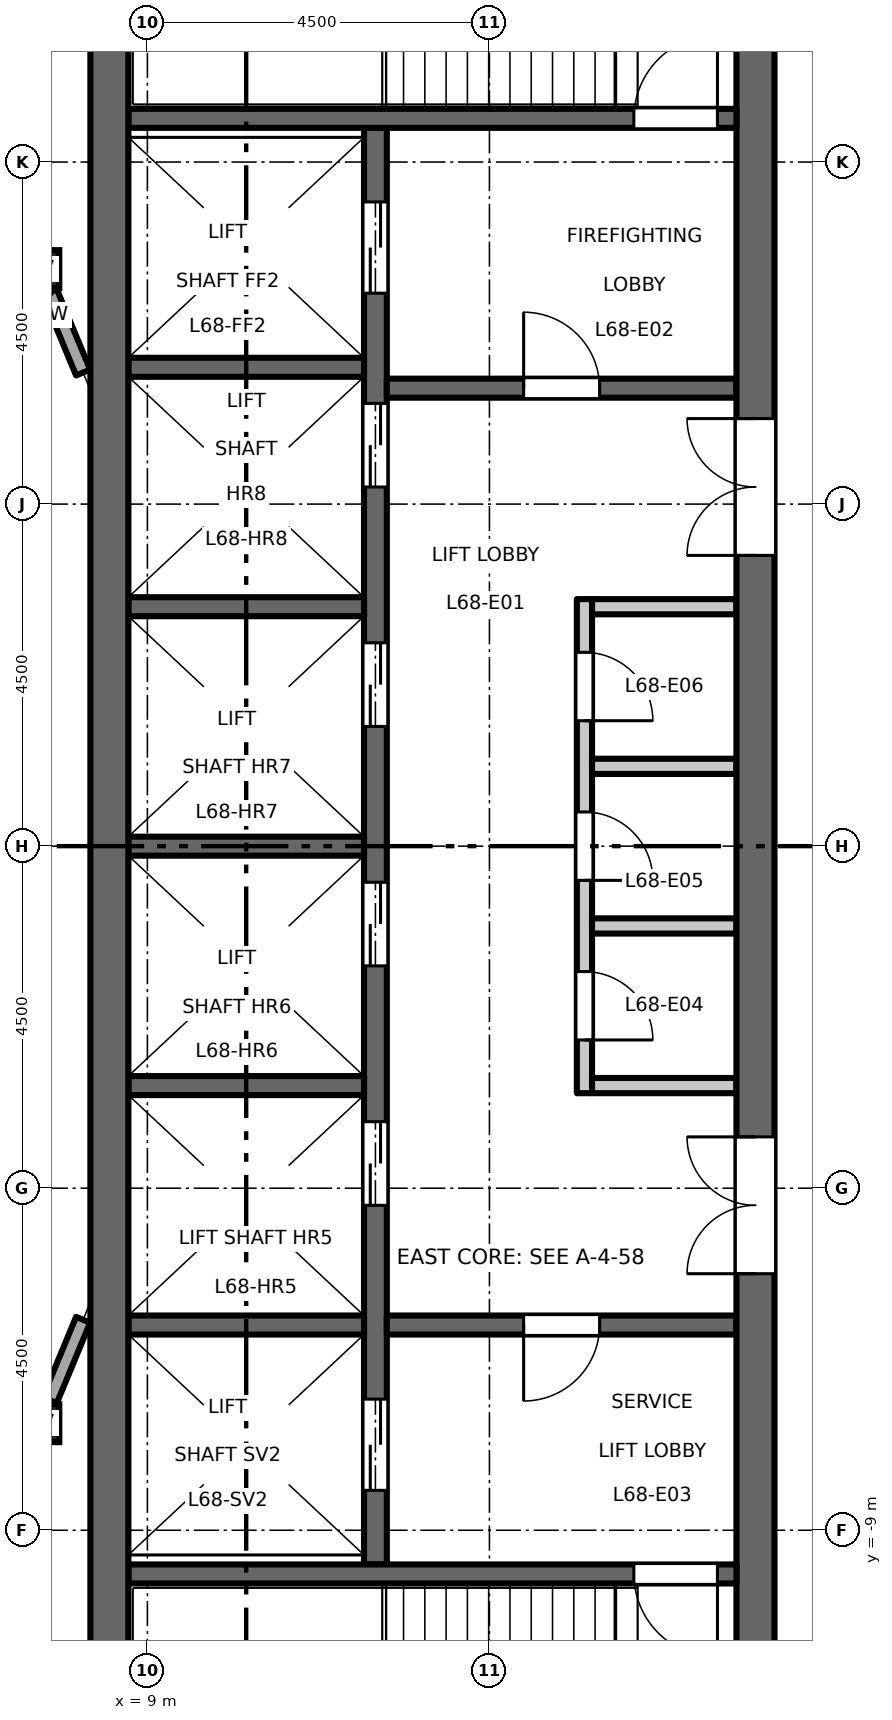
"""IFC4 building model, lengths in metres.
Left out: names, types, materials, properties, quantities, classifications, styles, units other than length and angle.
Written with IfcOpenShell. Run it as: python <this file> out.ifc"""

import sys

from ifc_helpers import new_model, si_unit, direction, frame, frame_2d, origin, origin_2d, place, context, subcontext, project, spatial, rectangle, hollow_rectangle, extrude, element, fill, save


model = new_model("IFC4")
c1 = context("Model", 3, precision=1e-05, world=origin(), true_north=direction((0.0, 1.0)))
c2 = subcontext(c1, "Body", "Model", "MODEL_VIEW")
j1 = project(units=[si_unit("LENGTHUNIT", "METRE"), si_unit("PLANEANGLEUNIT", "RADIAN")], contexts=[c1])
p1 = place(None, origin())
s1 = spatial("IfcSite", under=j1, at=p1, CompositionType="ELEMENT")
p2 = place(p1, origin())
s2 = spatial("IfcBuilding", under=s1, at=p2, CompositionType="ELEMENT")
p3 = place(p2, frame((0.0, 0.0, 316.7)))
s3 = spatial("IfcBuildingStorey", under=s2, at=p3, CompositionType="ELEMENT", Elevation=316.7)
for number, where, z_axis, x_axis in (
    (1, (7.591, -7.591, 0.0), (0.0, 0.0, 1.0), (1.0, 0.0, 0.0)),
    (2, (7.591, 7.591, 0.0), (0.0, 0.0, 1.0), (1.0, 0.0, 0.0)),
):
    element("IfcColumn", number, at=place(p3, frame(where, z_axis=z_axis, x_axis=x_axis)), inside=s3, PredefinedType="COLUMN", context=c2, shape_type="SweptSolid", body=[
        extrude(hollow_rectangle(XDim=0.5, YDim=0.5, WallThickness=0.025, at=origin_2d()), origin(), (0.0, 0.0, 1.0), 4.5),
    ])
p4 = place(p3, frame((14.75, -3.25, 0.0), z_axis=(0.0, 0.0, 1.0), x_axis=(0.0, 1.0, 0.0)))
e3 = element("IfcWall", 3, at=p4, inside=s3, PredefinedType="PARTITIONING", context=c2, shape_type="SweptSolid", body=[
    extrude(rectangle(XDim=6.5, YDim=0.2, at=frame_2d((3.25, 0.0))), origin(), (0.0, 0.0, 1.0), 4.35),
])
p5 = place(p4, frame((0.7, 0.0, 0.0)))
e4 = element("IfcOpeningElement", 4, at=p5, cuts=e3, PredefinedType="OPENING", context=c2, shape_type="SweptSolid", body=[
    extrude(rectangle(XDim=0.9, YDim=2.1, at=frame_2d((0.45, 1.05))), frame((0.0, 0.11, 0.0), z_axis=(0.0, -1.0, 0.0), x_axis=(1.0, 0.0, 0.0)), (0.0, 0.0, 1.0), 0.22),
])
p6 = place(p4, frame((2.8, 0.0, 0.0)))
e5 = element("IfcOpeningElement", 5, at=p6, cuts=e3, PredefinedType="OPENING", context=c2, shape_type="SweptSolid", body=[
    extrude(rectangle(XDim=0.9, YDim=2.1, at=frame_2d((0.45, 1.05))), frame((0.0, 0.11, 0.0), z_axis=(0.0, -1.0, 0.0), x_axis=(1.0, 0.0, 0.0)), (0.0, 0.0, 1.0), 0.22),
])
p7 = place(p4, frame((4.9, 0.0, 0.0)))
e6 = element("IfcOpeningElement", 6, at=p7, cuts=e3, PredefinedType="OPENING", context=c2, shape_type="SweptSolid", body=[
    extrude(rectangle(XDim=0.9, YDim=2.1, at=frame_2d((0.45, 1.05))), frame((0.0, 0.11, 0.0), z_axis=(0.0, -1.0, 0.0), x_axis=(1.0, 0.0, 0.0)), (0.0, 0.0, 1.0), 0.22),
])
for number, where, z_axis, x_axis in (
    (7, (14.85, 3.15, 0.0), (0.0, 0.0, 1.0), (1.0, 0.0, 0.0)),
    (8, (14.85, -3.15, 0.0), (0.0, 0.0, 1.0), (1.0, 0.0, 0.0)),
    (9, (14.85, -1.05, 0.0), (0.0, 0.0, 1.0), (1.0, 0.0, 0.0)),
    (10, (14.85, 1.05, 0.0), (0.0, 0.0, 1.0), (1.0, 0.0, 0.0)),
):
    element("IfcWall", number, at=place(p3, frame(where, z_axis=z_axis, x_axis=x_axis)), inside=s3, PredefinedType="PARTITIONING", context=c2, shape_type="SweptSolid", body=[
        extrude(rectangle(XDim=1.9, YDim=0.2, at=frame_2d((0.95, 0.0))), origin(), (0.0, 0.0, 1.0), 4.35),
    ])
p8 = place(p3, frame((12.0, -9.45, 0.0), z_axis=(0.0, 0.0, 1.0), x_axis=(0.0, 1.0, 0.0)))
e11 = element("IfcWall", 11, at=p8, inside=s3, PredefinedType="SHEAR", context=c2, shape_type="SweptSolid", body=[
    extrude(rectangle(XDim=18.9, YDim=0.3, at=frame_2d((9.45, 0.0))), origin(), (0.0, 0.0, 1.0), 4.35),
])
p9 = place(p8, frame((4.725, 0.0, 0.0)))
e12 = element("IfcOpeningElement", 12, at=p9, cuts=e11, PredefinedType="OPENING", context=c2, shape_type="SweptSolid", body=[
    extrude(rectangle(XDim=1.1, YDim=2.1, at=frame_2d((0.55, 1.05))), frame((0.0, 0.16, 0.0), z_axis=(0.0, -1.0, 0.0), x_axis=(1.0, 0.0, 0.0)), (0.0, 0.0, 1.0), 0.32),
])
p10 = place(p8, frame((7.875, 0.0, 0.0)))
e13 = element("IfcOpeningElement", 13, at=p10, cuts=e11, PredefinedType="OPENING", context=c2, shape_type="SweptSolid", body=[
    extrude(rectangle(XDim=1.1, YDim=2.1, at=frame_2d((0.55, 1.05))), frame((0.0, 0.16, 0.0), z_axis=(0.0, -1.0, 0.0), x_axis=(1.0, 0.0, 0.0)), (0.0, 0.0, 1.0), 0.32),
])
p11 = place(p8, frame((11.025, 0.0, 0.0)))
e14 = element("IfcOpeningElement", 14, at=p11, cuts=e11, PredefinedType="OPENING", context=c2, shape_type="SweptSolid", body=[
    extrude(rectangle(XDim=1.1, YDim=2.1, at=frame_2d((0.55, 1.05))), frame((0.0, 0.16, 0.0), z_axis=(0.0, -1.0, 0.0), x_axis=(1.0, 0.0, 0.0)), (0.0, 0.0, 1.0), 0.32),
])
p12 = place(p8, frame((14.175, 0.0, 0.0)))
e15 = element("IfcOpeningElement", 15, at=p12, cuts=e11, PredefinedType="OPENING", context=c2, shape_type="SweptSolid", body=[
    extrude(rectangle(XDim=1.1, YDim=2.1, at=frame_2d((0.55, 1.05))), frame((0.0, 0.16, 0.0), z_axis=(0.0, -1.0, 0.0), x_axis=(1.0, 0.0, 0.0)), (0.0, 0.0, 1.0), 0.32),
])
p13 = place(p8, frame((16.725, 0.0, 0.0)))
e16 = element("IfcOpeningElement", 16, at=p13, cuts=e11, PredefinedType="OPENING", context=c2, shape_type="SweptSolid", body=[
    extrude(rectangle(XDim=1.2, YDim=2.1, at=frame_2d((0.6, 1.05))), frame((0.0, 0.16, 0.0), z_axis=(0.0, -1.0, 0.0), x_axis=(1.0, 0.0, 0.0)), (0.0, 0.0, 1.0), 0.32),
])
p14 = place(p8, frame((0.975, 0.0, 0.0)))
e17 = element("IfcOpeningElement", 17, at=p14, cuts=e11, PredefinedType="OPENING", context=c2, shape_type="SweptSolid", body=[
    extrude(rectangle(XDim=1.2, YDim=2.1, at=frame_2d((0.6, 1.05))), frame((0.0, 0.16, 0.0), z_axis=(0.0, -1.0, 0.0), x_axis=(1.0, 0.0, 0.0)), (0.0, 0.0, 1.0), 0.32),
])
p15 = place(p3, frame((12.15, 6.025, 0.0), z_axis=(0.0, 0.0, 1.0), x_axis=(1.0, 0.0, 0.0)))
e18 = element("IfcWall", 18, at=p15, inside=s3, PredefinedType="SHEAR", context=c2, shape_type="SweptSolid", body=[
    extrude(rectangle(XDim=4.6, YDim=0.25, at=frame_2d((2.3, 0.0))), origin(), (0.0, 0.0, 1.0), 4.35),
])
p16 = place(p15, frame((1.8, 0.0, 0.0)))
e19 = element("IfcOpeningElement", 19, at=p16, cuts=e18, PredefinedType="OPENING", context=c2, shape_type="SweptSolid", body=[
    extrude(rectangle(XDim=1.0, YDim=2.1, at=frame_2d((0.5, 1.05))), frame((0.0, 0.135, 0.0), z_axis=(0.0, -1.0, 0.0), x_axis=(1.0, 0.0, 0.0)), (0.0, 0.0, 1.0), 0.27),
])
p17 = place(p3, frame((12.15, -6.3, 0.0), z_axis=(0.0, 0.0, 1.0), x_axis=(1.0, 0.0, 0.0)))
e20 = element("IfcWall", 20, at=p17, inside=s3, PredefinedType="SHEAR", context=c2, shape_type="SweptSolid", body=[
    extrude(rectangle(XDim=4.6, YDim=0.25, at=frame_2d((2.3, 0.0))), origin(), (0.0, 0.0, 1.0), 4.35),
])
p18 = place(p17, frame((1.8, 0.0, 0.0)))
e21 = element("IfcOpeningElement", 21, at=p18, cuts=e20, PredefinedType="OPENING", context=c2, shape_type="SweptSolid", body=[
    extrude(rectangle(XDim=1.0, YDim=2.1, at=frame_2d((0.5, 1.05))), frame((0.0, 0.135, 0.0), z_axis=(0.0, -1.0, 0.0), x_axis=(1.0, 0.0, 0.0)), (0.0, 0.0, 1.0), 0.27),
])
p19 = place(p3, frame((17.0, -13.0, 0.0), z_axis=(0.0, 0.0, 1.0), x_axis=(0.0, 1.0, 0.0)))
e22 = element("IfcWall", 22, at=p19, inside=s3, PredefinedType="SHEAR", context=c2, shape_type="SweptSolid", body=[
    extrude(rectangle(XDim=26.0, YDim=0.5, at=frame_2d((13.0, 0.0))), origin(), (0.0, 0.0, 1.0), 4.35),
])
p20 = place(p19, frame((16.825, 0.0, 0.0)))
e23 = element("IfcOpeningElement", 23, at=p20, cuts=e22, PredefinedType="OPENING", context=c2, shape_type="SweptSolid", body=[
    extrude(rectangle(XDim=1.8, YDim=2.1, at=frame_2d((0.9, 1.05))), frame((0.0, 0.26, 0.0), z_axis=(0.0, -1.0, 0.0), x_axis=(1.0, 0.0, 0.0)), (0.0, 0.0, 1.0), 0.52),
])
p21 = place(p19, frame((7.375, 0.0, 0.0)))
e24 = element("IfcOpeningElement", 24, at=p21, cuts=e22, PredefinedType="OPENING", context=c2, shape_type="SweptSolid", body=[
    extrude(rectangle(XDim=1.8, YDim=2.1, at=frame_2d((0.9, 1.05))), frame((0.0, 0.26, 0.0), z_axis=(0.0, -1.0, 0.0), x_axis=(1.0, 0.0, 0.0)), (0.0, 0.0, 1.0), 0.52),
])
for number, where, z_axis, x_axis in (
    (25, (8.75, 0.0, 0.0), (0.0, 0.0, 1.0), (1.0, 0.0, 0.0)),
    (26, (8.75, 3.15, 0.0), (0.0, 0.0, 1.0), (1.0, 0.0, 0.0)),
    (27, (8.75, 6.3, 0.0), (0.0, 0.0, 1.0), (1.0, 0.0, 0.0)),
    (28, (8.75, -3.15, 0.0), (0.0, 0.0, 1.0), (1.0, 0.0, 0.0)),
    (29, (8.75, -6.3, 0.0), (0.0, 0.0, 1.0), (1.0, 0.0, 0.0)),
):
    element("IfcWall", number, at=place(p3, frame(where, z_axis=z_axis, x_axis=x_axis)), inside=s3, PredefinedType="SHEAR", context=c2, shape_type="SweptSolid", body=[
        extrude(rectangle(XDim=3.1, YDim=0.25, at=frame_2d((1.55, 0.0))), origin(), (0.0, 0.0, 1.0), 4.35),
    ])
p22 = place(p3, frame((8.75, 9.575, 0.0), z_axis=(0.0, 0.0, 1.0), x_axis=(1.0, 0.0, 0.0)))
e30 = element("IfcWall", 30, at=p22, inside=s3, PredefinedType="SHEAR", context=c2, shape_type="SweptSolid", body=[
    extrude(rectangle(XDim=8.0, YDim=0.25, at=frame_2d((4.0, 0.0))), origin(), (0.0, 0.0, 1.0), 4.35),
])
p23 = place(p22, frame((6.65, 0.0, 0.0)))
e31 = element("IfcOpeningElement", 31, at=p23, cuts=e30, PredefinedType="OPENING", context=c2, shape_type="SweptSolid", body=[
    extrude(rectangle(XDim=1.1, YDim=2.1, at=frame_2d((0.55, 1.05))), frame((0.0, 0.135, 0.0), z_axis=(0.0, -1.0, 0.0), x_axis=(1.0, 0.0, 0.0)), (0.0, 0.0, 1.0), 0.27),
])
p24 = place(p3, frame((8.75, -9.575, 0.0), z_axis=(0.0, 0.0, 1.0), x_axis=(1.0, 0.0, 0.0)))
e32 = element("IfcWall", 32, at=p24, inside=s3, PredefinedType="SHEAR", context=c2, shape_type="SweptSolid", body=[
    extrude(rectangle(XDim=8.0, YDim=0.25, at=frame_2d((4.0, 0.0))), origin(), (0.0, 0.0, 1.0), 4.35),
])
p25 = place(p24, frame((6.65, 0.0, 0.0)))
e33 = element("IfcOpeningElement", 33, at=p25, cuts=e32, PredefinedType="OPENING", context=c2, shape_type="SweptSolid", body=[
    extrude(rectangle(XDim=1.1, YDim=2.1, at=frame_2d((0.55, 1.05))), frame((0.0, 0.135, 0.0), z_axis=(0.0, -1.0, 0.0), x_axis=(1.0, 0.0, 0.0)), (0.0, 0.0, 1.0), 0.27),
])
p26 = place(p3, frame((8.5, -13.0, 0.0), z_axis=(0.0, 0.0, 1.0), x_axis=(0.0, 1.0, 0.0)))
e34 = element("IfcWall", 34, at=p26, inside=s3, PredefinedType="SHEAR", context=c2, shape_type="SweptSolid", body=[
    extrude(rectangle(XDim=26.0, YDim=0.5, at=frame_2d((13.0, 0.0))), origin(), (0.0, 0.0, 1.0), 4.35),
])
for number, where, z_axis, x_axis in (
    (35, (7.716, -7.289, 0.0), (0.0, 0.0, 1.0), (0.383, 0.924, 0.0)),
    (36, (8.154, 6.231, 0.0), (0.0, 0.0, 1.0), (-0.383, 0.924, 0.0)),
):
    element("IfcWall", number, at=place(p3, frame(where, z_axis=z_axis, x_axis=x_axis)), inside=s3, PredefinedType="STANDARD", context=c2, shape_type="SweptSolid", body=[
        extrude(rectangle(XDim=1.146, YDim=0.2, at=frame_2d((0.573, 0.0))), origin(), (0.0, 0.0, 1.0), 4.01),
    ])
p27 = place(p16, origin())
e37 = element("IfcDoor", 37, at=p27, inside=s3, OperationType="SINGLE_SWING_RIGHT", PredefinedType="DOOR", context=c2, shape_type="SweptSolid", body=[
    extrude(rectangle(XDim=1.0, YDim=2.1, at=frame_2d((0.5, 1.05))), frame((0.0, 0.025, 0.0), z_axis=(0.0, -1.0, 0.0), x_axis=(1.0, 0.0, 0.0)), (0.0, 0.0, 1.0), 0.05),
])
fill(e19, e37)
p28 = place(p18, origin())
e38 = element("IfcDoor", 38, at=p28, inside=s3, OperationType="SINGLE_SWING_LEFT", PredefinedType="DOOR", context=c2, shape_type="SweptSolid", body=[
    extrude(rectangle(XDim=1.0, YDim=2.1, at=frame_2d((0.5, 1.05))), frame((0.0, 0.025, 0.0), z_axis=(0.0, -1.0, 0.0), x_axis=(1.0, 0.0, 0.0)), (0.0, 0.0, 1.0), 0.05),
])
fill(e21, e38)
p29 = place(p23, origin())
e39 = element("IfcDoor", 39, at=p29, inside=s3, OperationType="SINGLE_SWING_LEFT", PredefinedType="DOOR", context=c2, shape_type="SweptSolid", body=[
    extrude(rectangle(XDim=1.1, YDim=2.1, at=frame_2d((0.55, 1.05))), frame((0.0, 0.025, 0.0), z_axis=(0.0, -1.0, 0.0), x_axis=(1.0, 0.0, 0.0)), (0.0, 0.0, 1.0), 0.05),
])
fill(e31, e39)
p30 = place(p25, origin())
e40 = element("IfcDoor", 40, at=p30, inside=s3, OperationType="SINGLE_SWING_RIGHT", PredefinedType="DOOR", context=c2, shape_type="SweptSolid", body=[
    extrude(rectangle(XDim=1.1, YDim=2.1, at=frame_2d((0.55, 1.05))), frame((0.0, 0.025, 0.0), z_axis=(0.0, -1.0, 0.0), x_axis=(1.0, 0.0, 0.0)), (0.0, 0.0, 1.0), 0.05),
])
fill(e33, e40)
p31 = place(p20, origin())
e41 = element("IfcDoor", 41, at=p31, inside=s3, OperationType="DOUBLE_DOOR_DOUBLE_SWING", PredefinedType="DOOR", context=c2, shape_type="SweptSolid", body=[
    extrude(rectangle(XDim=1.8, YDim=2.1, at=frame_2d((0.9, 1.05))), frame((0.0, 0.025, 0.0), z_axis=(0.0, -1.0, 0.0), x_axis=(1.0, 0.0, 0.0)), (0.0, 0.0, 1.0), 0.05),
])
fill(e23, e41)
p32 = place(p21, origin())
e42 = element("IfcDoor", 42, at=p32, inside=s3, OperationType="DOUBLE_DOOR_DOUBLE_SWING", PredefinedType="DOOR", context=c2, shape_type="SweptSolid", body=[
    extrude(rectangle(XDim=1.8, YDim=2.1, at=frame_2d((0.9, 1.05))), frame((0.0, 0.025, 0.0), z_axis=(0.0, -1.0, 0.0), x_axis=(1.0, 0.0, 0.0)), (0.0, 0.0, 1.0), 0.05),
])
fill(e24, e42)
p33 = place(p9, origin())
e43 = element("IfcDoor", 43, at=p33, inside=s3, OperationType="DOUBLE_DOOR_SLIDING", PredefinedType="DOOR", context=c2, shape_type="SweptSolid", body=[
    extrude(rectangle(XDim=1.1, YDim=2.1, at=frame_2d((0.55, 1.05))), frame((0.0, 0.025, 0.0), z_axis=(0.0, -1.0, 0.0), x_axis=(1.0, 0.0, 0.0)), (0.0, 0.0, 1.0), 0.05),
])
fill(e12, e43)
p34 = place(p10, origin())
e44 = element("IfcDoor", 44, at=p34, inside=s3, OperationType="DOUBLE_DOOR_SLIDING", PredefinedType="DOOR", context=c2, shape_type="SweptSolid", body=[
    extrude(rectangle(XDim=1.1, YDim=2.1, at=frame_2d((0.55, 1.05))), frame((0.0, 0.025, 0.0), z_axis=(0.0, -1.0, 0.0), x_axis=(1.0, 0.0, 0.0)), (0.0, 0.0, 1.0), 0.05),
])
fill(e13, e44)
p35 = place(p11, origin())
e45 = element("IfcDoor", 45, at=p35, inside=s3, OperationType="DOUBLE_DOOR_SLIDING", PredefinedType="DOOR", context=c2, shape_type="SweptSolid", body=[
    extrude(rectangle(XDim=1.1, YDim=2.1, at=frame_2d((0.55, 1.05))), frame((0.0, 0.025, 0.0), z_axis=(0.0, -1.0, 0.0), x_axis=(1.0, 0.0, 0.0)), (0.0, 0.0, 1.0), 0.05),
])
fill(e14, e45)
p36 = place(p12, origin())
e46 = element("IfcDoor", 46, at=p36, inside=s3, OperationType="DOUBLE_DOOR_SLIDING", PredefinedType="DOOR", context=c2, shape_type="SweptSolid", body=[
    extrude(rectangle(XDim=1.1, YDim=2.1, at=frame_2d((0.55, 1.05))), frame((0.0, 0.025, 0.0), z_axis=(0.0, -1.0, 0.0), x_axis=(1.0, 0.0, 0.0)), (0.0, 0.0, 1.0), 0.05),
])
fill(e15, e46)
p37 = place(p13, origin())
e47 = element("IfcDoor", 47, at=p37, inside=s3, OperationType="DOUBLE_DOOR_SLIDING", PredefinedType="DOOR", context=c2, shape_type="SweptSolid", body=[
    extrude(rectangle(XDim=1.2, YDim=2.1, at=frame_2d((0.6, 1.05))), frame((0.0, 0.025, 0.0), z_axis=(0.0, -1.0, 0.0), x_axis=(1.0, 0.0, 0.0)), (0.0, 0.0, 1.0), 0.05),
])
fill(e16, e47)
p38 = place(p14, origin())
e48 = element("IfcDoor", 48, at=p38, inside=s3, OperationType="DOUBLE_DOOR_SLIDING", PredefinedType="DOOR", context=c2, shape_type="SweptSolid", body=[
    extrude(rectangle(XDim=1.2, YDim=2.1, at=frame_2d((0.6, 1.05))), frame((0.0, 0.025, 0.0), z_axis=(0.0, -1.0, 0.0), x_axis=(1.0, 0.0, 0.0)), (0.0, 0.0, 1.0), 0.05),
])
fill(e17, e48)
p39 = place(p5, origin())
e49 = element("IfcDoor", 49, at=p39, inside=s3, OperationType="SINGLE_SWING_LEFT", PredefinedType="DOOR", context=c2, shape_type="SweptSolid", body=[
    extrude(rectangle(XDim=0.9, YDim=2.1, at=frame_2d((0.45, 1.05))), frame((0.0, 0.025, 0.0), z_axis=(0.0, -1.0, 0.0), x_axis=(1.0, 0.0, 0.0)), (0.0, 0.0, 1.0), 0.05),
])
fill(e4, e49)
p40 = place(p6, origin())
e50 = element("IfcDoor", 50, at=p40, inside=s3, OperationType="SINGLE_SWING_LEFT", PredefinedType="DOOR", context=c2, shape_type="SweptSolid", body=[
    extrude(rectangle(XDim=0.9, YDim=2.1, at=frame_2d((0.45, 1.05))), frame((0.0, 0.025, 0.0), z_axis=(0.0, -1.0, 0.0), x_axis=(1.0, 0.0, 0.0)), (0.0, 0.0, 1.0), 0.05),
])
fill(e5, e50)
p41 = place(p7, origin())
e51 = element("IfcDoor", 51, at=p41, inside=s3, OperationType="SINGLE_SWING_LEFT", PredefinedType="DOOR", context=c2, shape_type="SweptSolid", body=[
    extrude(rectangle(XDim=0.9, YDim=2.1, at=frame_2d((0.45, 1.05))), frame((0.0, 0.025, 0.0), z_axis=(0.0, -1.0, 0.0), x_axis=(1.0, 0.0, 0.0)), (0.0, 0.0, 1.0), 0.05),
])
fill(e6, e51)
save(model, sys.argv[1])
